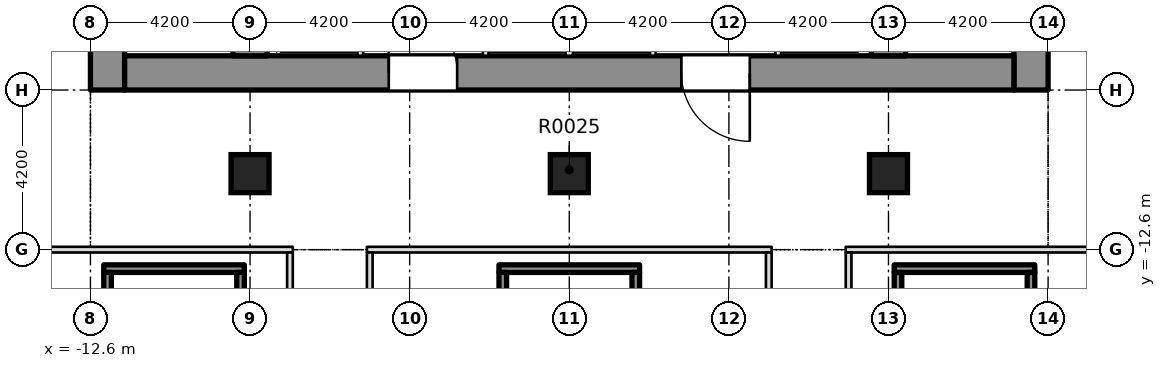
"""IFC4 building model, lengths in metres.
Left out: names, types, materials, properties, quantities, classifications, styles, units other than length and angle.
Written with IfcOpenShell. Run it as: python <this file> out.ifc"""

import sys

from ifc_helpers import new_model, si_unit, direction, frame, frame_2d, origin, origin_2d, place, context, subcontext, project, spatial, rectangle, extrude, element, fill, save


model = new_model("IFC4")
c1 = context("Model", 3, precision=1e-05, world=origin(), true_north=direction((0.0, 1.0)))
c2 = subcontext(c1, "Body", "Model", "MODEL_VIEW")
j1 = project(units=[si_unit("LENGTHUNIT", "METRE"), si_unit("PLANEANGLEUNIT", "RADIAN")], contexts=[c1])
p1 = place(None, origin())
s1 = spatial("IfcSite", under=j1, at=p1, CompositionType="ELEMENT")
p2 = place(p1, origin())
s2 = spatial("IfcBuilding", under=s1, at=p2, CompositionType="ELEMENT")
p3 = place(p2, origin())
s3 = spatial("IfcBuildingStorey", under=s2, at=p3, CompositionType="ELEMENT", Elevation=0.0)
p4 = place(p3, frame((12.15, -8.4, -0.45), z_axis=(0.0, 0.0, 1.0), x_axis=(0.0, 1.0, 0.0)))
e1 = element("IfcWall", 1, at=p4, inside=s3, PredefinedType="SHEAR", context=c2, shape_type="SweptSolid", body=[
    extrude(rectangle(XDim=30.15, YDim=0.9, at=frame_2d((15.075, 0.0))), origin(), (0.0, 0.0, 1.0), 7.55),
])
p5 = place(p4, frame((2.875, 0.0, 0.45)))
e2 = element("IfcOpeningElement", 2, at=p5, cuts=e1, PredefinedType="OPENING", context=c2, shape_type="SweptSolid", body=[
    extrude(rectangle(XDim=0.95, YDim=2.1, at=frame_2d((0.475, 1.05))), frame((0.0, 0.46, 0.0), z_axis=(0.0, -1.0, 0.0), x_axis=(1.0, 0.0, 0.0)), (0.0, 0.0, 1.0), 0.92),
])
p6 = place(p4, frame((6.575, 0.0, 0.45)))
e3 = element("IfcOpeningElement", 3, at=p6, cuts=e1, PredefinedType="OPENING", context=c2, shape_type="SweptSolid", body=[
    extrude(rectangle(XDim=0.95, YDim=2.1, at=frame_2d((0.475, 1.05))), frame((0.0, 0.46, 0.0), z_axis=(0.0, -1.0, 0.0), x_axis=(1.0, 0.0, 0.0)), (0.0, 0.0, 1.0), 0.92),
])
p7 = place(p4, frame((9.425, 0.0, 0.45)))
e4 = element("IfcOpeningElement", 4, at=p7, cuts=e1, PredefinedType="OPENING", context=c2, shape_type="SweptSolid", body=[
    extrude(rectangle(XDim=0.95, YDim=2.1, at=frame_2d((0.475, 1.05))), frame((0.0, 0.46, 0.0), z_axis=(0.0, -1.0, 0.0), x_axis=(1.0, 0.0, 0.0)), (0.0, 0.0, 1.0), 0.92),
])
p8 = place(p4, frame((13.225, 0.0, 0.45)))
e5 = element("IfcOpeningElement", 5, at=p8, cuts=e1, PredefinedType="OPENING", context=c2, shape_type="SweptSolid", body=[
    extrude(rectangle(XDim=0.95, YDim=2.1, at=frame_2d((0.475, 1.05))), frame((0.0, 0.46, 0.0), z_axis=(0.0, -1.0, 0.0), x_axis=(1.0, 0.0, 0.0)), (0.0, 0.0, 1.0), 0.92),
])
p9 = place(p4, frame((16.775, 0.0, 0.45)))
e6 = element("IfcOpeningElement", 6, at=p9, cuts=e1, PredefinedType="OPENING", context=c2, shape_type="SweptSolid", body=[
    extrude(rectangle(XDim=0.95, YDim=2.1, at=frame_2d((0.475, 1.05))), frame((0.0, 0.46, 0.0), z_axis=(0.0, -1.0, 0.0), x_axis=(1.0, 0.0, 0.0)), (0.0, 0.0, 1.0), 0.92),
])
p10 = place(p4, frame((24.75, 0.0, 0.45)))
e7 = element("IfcOpeningElement", 7, at=p10, cuts=e1, PredefinedType="OPENING", context=c2, shape_type="SweptSolid", body=[
    extrude(rectangle(XDim=0.95, YDim=2.1, at=frame_2d((0.475, 1.05))), frame((0.0, 0.46, 0.0), z_axis=(0.0, -1.0, 0.0), x_axis=(1.0, 0.0, 0.0)), (0.0, 0.0, 1.0), 0.92),
])
p11 = place(p4, frame((19.3, 0.0, 0.45)))
e8 = element("IfcOpeningElement", 8, at=p11, cuts=e1, PredefinedType="OPENING", context=c2, shape_type="SweptSolid", body=[
    extrude(rectangle(XDim=1.2, YDim=2.1, at=frame_2d((0.6, 1.05))), frame((0.0, 0.46, 0.0), z_axis=(0.0, -1.0, 0.0), x_axis=(1.0, 0.0, 0.0)), (0.0, 0.0, 1.0), 0.92),
])
p12 = place(p3, frame((-12.15, -8.4, -0.45), z_axis=(0.0, 0.0, 1.0), x_axis=(0.0, 1.0, 0.0)))
e9 = element("IfcWall", 9, at=p12, inside=s3, PredefinedType="SHEAR", context=c2, shape_type="SweptSolid", body=[
    extrude(rectangle(XDim=30.15, YDim=0.9, at=frame_2d((15.075, 0.0))), origin(), (0.0, 0.0, 1.0), 7.55),
])
p13 = place(p12, frame((3.925, 0.0, 0.45)))
e10 = element("IfcOpeningElement", 10, at=p13, cuts=e9, PredefinedType="OPENING", context=c2, shape_type="SweptSolid", body=[
    extrude(rectangle(XDim=0.95, YDim=2.1, at=frame_2d((0.475, 1.05))), frame((0.0, 0.46, 0.0), z_axis=(0.0, -1.0, 0.0), x_axis=(1.0, 0.0, 0.0)), (0.0, 0.0, 1.0), 0.92),
])
p14 = place(p12, frame((9.175, 0.0, 0.45)))
e11 = element("IfcOpeningElement", 11, at=p14, cuts=e9, PredefinedType="OPENING", context=c2, shape_type="SweptSolid", body=[
    extrude(rectangle(XDim=0.95, YDim=2.1, at=frame_2d((0.475, 1.05))), frame((0.0, 0.46, 0.0), z_axis=(0.0, -1.0, 0.0), x_axis=(1.0, 0.0, 0.0)), (0.0, 0.0, 1.0), 0.92),
])
p15 = place(p12, frame((14.525, 0.0, 0.45)))
e12 = element("IfcOpeningElement", 12, at=p15, cuts=e9, PredefinedType="OPENING", context=c2, shape_type="SweptSolid", body=[
    extrude(rectangle(XDim=0.95, YDim=2.1, at=frame_2d((0.475, 1.05))), frame((0.0, 0.46, 0.0), z_axis=(0.0, -1.0, 0.0), x_axis=(1.0, 0.0, 0.0)), (0.0, 0.0, 1.0), 0.92),
])
p16 = place(p12, frame((22.225, 0.0, 0.45)))
e13 = element("IfcOpeningElement", 13, at=p16, cuts=e9, PredefinedType="OPENING", context=c2, shape_type="SweptSolid", body=[
    extrude(rectangle(XDim=0.95, YDim=2.1, at=frame_2d((0.475, 1.05))), frame((0.0, 0.46, 0.0), z_axis=(0.0, -1.0, 0.0), x_axis=(1.0, 0.0, 0.0)), (0.0, 0.0, 1.0), 0.92),
])
p17 = place(p12, frame((26.25, 0.0, 0.45)))
e14 = element("IfcOpeningElement", 14, at=p17, cuts=e9, PredefinedType="OPENING", context=c2, shape_type="SweptSolid", body=[
    extrude(rectangle(XDim=0.95, YDim=2.1, at=frame_2d((0.475, 1.05))), frame((0.0, 0.46, 0.0), z_axis=(0.0, -1.0, 0.0), x_axis=(1.0, 0.0, 0.0)), (0.0, 0.0, 1.0), 0.92),
])
p18 = place(p12, frame((19.3, 0.0, 0.45)))
e15 = element("IfcOpeningElement", 15, at=p18, cuts=e9, PredefinedType="OPENING", context=c2, shape_type="SweptSolid", body=[
    extrude(rectangle(XDim=1.2, YDim=2.1, at=frame_2d((0.6, 1.05))), frame((0.0, 0.46, 0.0), z_axis=(0.0, -1.0, 0.0), x_axis=(1.0, 0.0, 0.0)), (0.0, 0.0, 1.0), 0.92),
])
p19 = place(p3, frame((-11.7, -7.95, -0.45), z_axis=(0.0, 0.0, 1.0), x_axis=(1.0, 0.0, 0.0)))
e16 = element("IfcWall", 16, at=p19, inside=s3, PredefinedType="SHEAR", context=c2, shape_type="SweptSolid", body=[
    extrude(rectangle(XDim=23.4, YDim=0.9, at=frame_2d((11.7, 0.0))), origin(), (0.0, 0.0, 1.0), 7.55),
])
p20 = place(p19, frame((6.95, 0.0, 0.45)))
e17 = element("IfcOpeningElement", 17, at=p20, cuts=e16, PredefinedType="OPENING", context=c2, shape_type="SweptSolid", body=[
    extrude(rectangle(XDim=1.8, YDim=2.1, at=frame_2d((0.9, 1.05))), frame((0.0, 0.46, 0.0), z_axis=(0.0, -1.0, 0.0), x_axis=(1.0, 0.0, 0.0)), (0.0, 0.0, 1.0), 0.92),
])
p21 = place(p19, frame((14.65, 0.0, 0.45)))
e18 = element("IfcOpeningElement", 18, at=p21, cuts=e16, PredefinedType="OPENING", context=c2, shape_type="SweptSolid", body=[
    extrude(rectangle(XDim=1.8, YDim=2.1, at=frame_2d((0.9, 1.05))), frame((0.0, 0.46, 0.0), z_axis=(0.0, -1.0, 0.0), x_axis=(1.0, 0.0, 0.0)), (0.0, 0.0, 1.0), 0.92),
])
p22 = place(p3, frame((-8.4, -7.5, -0.45), z_axis=(0.0, 0.0, 1.0), x_axis=(0.0, 1.0, 0.0)))
e19 = element("IfcWall", 19, at=p22, inside=s3, PredefinedType="SHEAR", context=c2, shape_type="SweptSolid", body=[
    extrude(rectangle(XDim=28.35, YDim=0.9, at=frame_2d((14.175, 0.0))), origin(), (0.0, 0.0, 1.0), 7.55),
])
p23 = place(p22, frame((18.4, 0.0, 0.45)))
e20 = element("IfcOpeningElement", 20, at=p23, cuts=e19, PredefinedType="OPENING", context=c2, shape_type="SweptSolid", body=[
    extrude(rectangle(XDim=1.2, YDim=2.1, at=frame_2d((0.6, 1.05))), frame((0.0, 0.46, 0.0), z_axis=(0.0, -1.0, 0.0), x_axis=(1.0, 0.0, 0.0)), (0.0, 0.0, 1.0), 0.92),
])
p24 = place(p3, frame((8.4, -7.5, -0.45), z_axis=(0.0, 0.0, 1.0), x_axis=(0.0, 1.0, 0.0)))
e21 = element("IfcWall", 21, at=p24, inside=s3, PredefinedType="SHEAR", context=c2, shape_type="SweptSolid", body=[
    extrude(rectangle(XDim=28.35, YDim=0.9, at=frame_2d((14.175, 0.0))), origin(), (0.0, 0.0, 1.0), 7.55),
])
p25 = place(p24, frame((18.4, 0.0, 0.45)))
e22 = element("IfcOpeningElement", 22, at=p25, cuts=e21, PredefinedType="OPENING", context=c2, shape_type="SweptSolid", body=[
    extrude(rectangle(XDim=1.2, YDim=2.1, at=frame_2d((0.6, 1.05))), frame((0.0, 0.46, 0.0), z_axis=(0.0, -1.0, 0.0), x_axis=(1.0, 0.0, 0.0)), (0.0, 0.0, 1.0), 0.92),
])
for number, where, z_axis, x_axis in (
    (23, (-8.4, -10.6, -0.45), (0.0, 0.0, 1.0), (1.0, 0.0, 0.0)),
    (24, (0.0, -10.6, -0.45), (0.0, 0.0, 1.0), (1.0, 0.0, 0.0)),
    (25, (8.4, -10.6, -0.45), (0.0, 0.0, 1.0), (1.0, 0.0, 0.0)),
):
    element("IfcColumn", number, at=place(p3, frame(where, z_axis=z_axis, x_axis=x_axis)), inside=s3, PredefinedType="COLUMN", context=c2, shape_type="SweptSolid", body=[
        extrude(rectangle(XDim=1.0, YDim=1.0, at=origin_2d()), origin(), (0.0, 0.0, 1.0), 7.55),
    ])
p26 = place(p3, frame((-16.9, -12.6, 0.0), z_axis=(0.0, 0.0, 1.0), x_axis=(1.0, 0.0, 0.0)))
e26 = element("IfcWall", 26, at=p26, inside=s3, PredefinedType="PARTITIONING", context=c2, shape_type="SweptSolid", body=[
    extrude(rectangle(XDim=9.625, YDim=0.15, at=frame_2d((4.812, 0.0))), origin(), (0.0, 0.0, 1.0), 7.1),
])
p27 = place(p3, frame((-5.325, -12.6, 0.0), z_axis=(0.0, 0.0, 1.0), x_axis=(1.0, 0.0, 0.0)))
e27 = element("IfcWall", 27, at=p27, inside=s3, PredefinedType="PARTITIONING", context=c2, shape_type="SweptSolid", body=[
    extrude(rectangle(XDim=10.65, YDim=0.15, at=frame_2d((5.325, 0.0))), origin(), (0.0, 0.0, 1.0), 7.1),
])
p28 = place(p3, frame((7.275, -12.6, 0.0), z_axis=(0.0, 0.0, 1.0), x_axis=(1.0, 0.0, 0.0)))
e28 = element("IfcWall", 28, at=p28, inside=s3, PredefinedType="PARTITIONING", context=c2, shape_type="SweptSolid", body=[
    extrude(rectangle(XDim=9.625, YDim=0.15, at=frame_2d((4.812, 0.0))), origin(), (0.0, 0.0, 1.0), 7.1),
])
for number, where, z_axis, x_axis in (
    (29, (-7.35, -18.125, 0.0), (0.0, 0.0, 1.0), (0.0, 1.0, 0.0)),
    (30, (-5.25, -18.125, 0.0), (0.0, 0.0, 1.0), (0.0, 1.0, 0.0)),
    (31, (5.25, -18.125, 0.0), (0.0, 0.0, 1.0), (0.0, 1.0, 0.0)),
    (32, (7.35, -18.125, 0.0), (0.0, 0.0, 1.0), (0.0, 1.0, 0.0)),
):
    element("IfcWall", number, at=place(p3, frame(where, z_axis=z_axis, x_axis=x_axis)), inside=s3, PredefinedType="PARTITIONING", context=c2, shape_type="SweptSolid", body=[
        extrude(rectangle(XDim=5.45, YDim=0.15, at=frame_2d((2.725, 0.0))), origin(), (0.0, 0.0, 1.0), 7.1),
    ])
p29 = place(p3, frame((-5.5, -7.499, 0.0), z_axis=(0.0, 0.0, 1.0), x_axis=(0.0, 1.0, 0.0)))
e33 = element("IfcWall", 33, at=p29, inside=s3, PredefinedType="PARTITIONING", context=c2, shape_type="SweptSolid", body=[
    extrude(rectangle(XDim=11.924, YDim=0.15, at=frame_2d((5.962, 0.0))), origin(), (0.0, 0.0, 1.0), 7.1),
])
p30 = place(p29, frame((0.949, 0.0, 0.0)))
e34 = element("IfcOpeningElement", 34, at=p30, cuts=e33, PredefinedType="OPENING", context=c2, shape_type="SweptSolid", body=[
    extrude(rectangle(XDim=1.1, YDim=2.1, at=frame_2d((0.55, 1.05))), frame((0.0, 0.085, 0.0), z_axis=(0.0, -1.0, 0.0), x_axis=(1.0, 0.0, 0.0)), (0.0, 0.0, 1.0), 0.17),
])
p31 = place(p29, frame((3.949, 0.0, 0.0)))
e35 = element("IfcOpeningElement", 35, at=p31, cuts=e33, PredefinedType="OPENING", context=c2, shape_type="SweptSolid", body=[
    extrude(rectangle(XDim=1.1, YDim=2.1, at=frame_2d((0.55, 1.05))), frame((0.0, 0.085, 0.0), z_axis=(0.0, -1.0, 0.0), x_axis=(1.0, 0.0, 0.0)), (0.0, 0.0, 1.0), 0.17),
])
p32 = place(p29, frame((6.949, 0.0, 0.0)))
e36 = element("IfcOpeningElement", 36, at=p32, cuts=e33, PredefinedType="OPENING", context=c2, shape_type="SweptSolid", body=[
    extrude(rectangle(XDim=1.1, YDim=2.1, at=frame_2d((0.55, 1.05))), frame((0.0, 0.085, 0.0), z_axis=(0.0, -1.0, 0.0), x_axis=(1.0, 0.0, 0.0)), (0.0, 0.0, 1.0), 0.17),
])
p33 = place(p29, frame((9.949, 0.0, 0.0)))
e37 = element("IfcOpeningElement", 37, at=p33, cuts=e33, PredefinedType="OPENING", context=c2, shape_type="SweptSolid", body=[
    extrude(rectangle(XDim=1.1, YDim=2.1, at=frame_2d((0.55, 1.05))), frame((0.0, 0.085, 0.0), z_axis=(0.0, -1.0, 0.0), x_axis=(1.0, 0.0, 0.0)), (0.0, 0.0, 1.0), 0.17),
])
p34 = place(p3, frame((-2.2, -7.499, 0.0), z_axis=(0.0, 0.0, 1.0), x_axis=(0.0, 1.0, 0.0)))
e38 = element("IfcWall", 38, at=p34, inside=s3, PredefinedType="PARTITIONING", context=c2, shape_type="SweptSolid", body=[
    extrude(rectangle(XDim=11.924, YDim=0.15, at=frame_2d((5.962, 0.0))), origin(), (0.0, 0.0, 1.0), 7.1),
])
p35 = place(p34, frame((0.949, 0.0, 0.0)))
e39 = element("IfcOpeningElement", 39, at=p35, cuts=e38, PredefinedType="OPENING", context=c2, shape_type="SweptSolid", body=[
    extrude(rectangle(XDim=1.1, YDim=2.1, at=frame_2d((0.55, 1.05))), frame((0.0, 0.085, 0.0), z_axis=(0.0, -1.0, 0.0), x_axis=(1.0, 0.0, 0.0)), (0.0, 0.0, 1.0), 0.17),
])
p36 = place(p34, frame((3.949, 0.0, 0.0)))
e40 = element("IfcOpeningElement", 40, at=p36, cuts=e38, PredefinedType="OPENING", context=c2, shape_type="SweptSolid", body=[
    extrude(rectangle(XDim=1.1, YDim=2.1, at=frame_2d((0.55, 1.05))), frame((0.0, 0.085, 0.0), z_axis=(0.0, -1.0, 0.0), x_axis=(1.0, 0.0, 0.0)), (0.0, 0.0, 1.0), 0.17),
])
p37 = place(p34, frame((6.949, 0.0, 0.0)))
e41 = element("IfcOpeningElement", 41, at=p37, cuts=e38, PredefinedType="OPENING", context=c2, shape_type="SweptSolid", body=[
    extrude(rectangle(XDim=1.1, YDim=2.1, at=frame_2d((0.55, 1.05))), frame((0.0, 0.085, 0.0), z_axis=(0.0, -1.0, 0.0), x_axis=(1.0, 0.0, 0.0)), (0.0, 0.0, 1.0), 0.17),
])
p38 = place(p34, frame((9.949, 0.0, 0.0)))
e42 = element("IfcOpeningElement", 42, at=p38, cuts=e38, PredefinedType="OPENING", context=c2, shape_type="SweptSolid", body=[
    extrude(rectangle(XDim=1.1, YDim=2.1, at=frame_2d((0.55, 1.05))), frame((0.0, 0.085, 0.0), z_axis=(0.0, -1.0, 0.0), x_axis=(1.0, 0.0, 0.0)), (0.0, 0.0, 1.0), 0.17),
])
p39 = place(p3, frame((0.0, -7.499, 0.0), z_axis=(0.0, 0.0, 1.0), x_axis=(0.0, 1.0, 0.0)))
e43 = element("IfcWall", 43, at=p39, inside=s3, PredefinedType="PARTITIONING", context=c2, shape_type="SweptSolid", body=[
    extrude(rectangle(XDim=11.924, YDim=0.2, at=frame_2d((5.962, 0.0))), origin(), (0.0, 0.0, 1.0), 7.1),
])
p40 = place(p3, frame((2.2, -7.499, 0.0), z_axis=(0.0, 0.0, 1.0), x_axis=(0.0, 1.0, 0.0)))
e44 = element("IfcWall", 44, at=p40, inside=s3, PredefinedType="PARTITIONING", context=c2, shape_type="SweptSolid", body=[
    extrude(rectangle(XDim=11.924, YDim=0.15, at=frame_2d((5.962, 0.0))), origin(), (0.0, 0.0, 1.0), 7.1),
])
p41 = place(p40, frame((0.949, 0.0, 0.0)))
e45 = element("IfcOpeningElement", 45, at=p41, cuts=e44, PredefinedType="OPENING", context=c2, shape_type="SweptSolid", body=[
    extrude(rectangle(XDim=1.1, YDim=2.1, at=frame_2d((0.55, 1.05))), frame((0.0, 0.085, 0.0), z_axis=(0.0, -1.0, 0.0), x_axis=(1.0, 0.0, 0.0)), (0.0, 0.0, 1.0), 0.17),
])
p42 = place(p40, frame((3.949, 0.0, 0.0)))
e46 = element("IfcOpeningElement", 46, at=p42, cuts=e44, PredefinedType="OPENING", context=c2, shape_type="SweptSolid", body=[
    extrude(rectangle(XDim=1.1, YDim=2.1, at=frame_2d((0.55, 1.05))), frame((0.0, 0.085, 0.0), z_axis=(0.0, -1.0, 0.0), x_axis=(1.0, 0.0, 0.0)), (0.0, 0.0, 1.0), 0.17),
])
p43 = place(p40, frame((6.949, 0.0, 0.0)))
e47 = element("IfcOpeningElement", 47, at=p43, cuts=e44, PredefinedType="OPENING", context=c2, shape_type="SweptSolid", body=[
    extrude(rectangle(XDim=1.1, YDim=2.1, at=frame_2d((0.55, 1.05))), frame((0.0, 0.085, 0.0), z_axis=(0.0, -1.0, 0.0), x_axis=(1.0, 0.0, 0.0)), (0.0, 0.0, 1.0), 0.17),
])
p44 = place(p40, frame((9.949, 0.0, 0.0)))
e48 = element("IfcOpeningElement", 48, at=p44, cuts=e44, PredefinedType="OPENING", context=c2, shape_type="SweptSolid", body=[
    extrude(rectangle(XDim=1.1, YDim=2.1, at=frame_2d((0.55, 1.05))), frame((0.0, 0.085, 0.0), z_axis=(0.0, -1.0, 0.0), x_axis=(1.0, 0.0, 0.0)), (0.0, 0.0, 1.0), 0.17),
])
p45 = place(p3, frame((5.5, -7.499, 0.0), z_axis=(0.0, 0.0, 1.0), x_axis=(0.0, 1.0, 0.0)))
e49 = element("IfcWall", 49, at=p45, inside=s3, PredefinedType="PARTITIONING", context=c2, shape_type="SweptSolid", body=[
    extrude(rectangle(XDim=11.924, YDim=0.15, at=frame_2d((5.962, 0.0))), origin(), (0.0, 0.0, 1.0), 7.1),
])
p46 = place(p45, frame((0.949, 0.0, 0.0)))
e50 = element("IfcOpeningElement", 50, at=p46, cuts=e49, PredefinedType="OPENING", context=c2, shape_type="SweptSolid", body=[
    extrude(rectangle(XDim=1.1, YDim=2.1, at=frame_2d((0.55, 1.05))), frame((0.0, 0.085, 0.0), z_axis=(0.0, -1.0, 0.0), x_axis=(1.0, 0.0, 0.0)), (0.0, 0.0, 1.0), 0.17),
])
p47 = place(p45, frame((3.949, 0.0, 0.0)))
e51 = element("IfcOpeningElement", 51, at=p47, cuts=e49, PredefinedType="OPENING", context=c2, shape_type="SweptSolid", body=[
    extrude(rectangle(XDim=1.1, YDim=2.1, at=frame_2d((0.55, 1.05))), frame((0.0, 0.085, 0.0), z_axis=(0.0, -1.0, 0.0), x_axis=(1.0, 0.0, 0.0)), (0.0, 0.0, 1.0), 0.17),
])
p48 = place(p45, frame((6.949, 0.0, 0.0)))
e52 = element("IfcOpeningElement", 52, at=p48, cuts=e49, PredefinedType="OPENING", context=c2, shape_type="SweptSolid", body=[
    extrude(rectangle(XDim=1.1, YDim=2.1, at=frame_2d((0.55, 1.05))), frame((0.0, 0.085, 0.0), z_axis=(0.0, -1.0, 0.0), x_axis=(1.0, 0.0, 0.0)), (0.0, 0.0, 1.0), 0.17),
])
p49 = place(p45, frame((9.949, 0.0, 0.0)))
e53 = element("IfcOpeningElement", 53, at=p49, cuts=e49, PredefinedType="OPENING", context=c2, shape_type="SweptSolid", body=[
    extrude(rectangle(XDim=1.1, YDim=2.1, at=frame_2d((0.55, 1.05))), frame((0.0, 0.085, 0.0), z_axis=(0.0, -1.0, 0.0), x_axis=(1.0, 0.0, 0.0)), (0.0, 0.0, 1.0), 0.17),
])
p50 = place(p3, frame((-12.25, -13.1, 0.0), z_axis=(0.0, 0.0, 1.0), x_axis=(1.0, 0.0, 0.0)))
e54 = element("IfcWall", 54, at=p50, inside=s3, PredefinedType="SOLIDWALL", context=c2, shape_type="SweptSolid", body=[
    extrude(rectangle(XDim=3.7, YDim=0.2, at=frame_2d((1.85, 0.0))), origin(), (0.0, 0.0, 1.0), 7.1),
])
p51 = place(p3, frame((-12.15, -19.8, 0.0), z_axis=(0.0, 0.0, 1.0), x_axis=(0.0, 1.0, 0.0)))
e55 = element("IfcWall", 55, at=p51, inside=s3, PredefinedType="SOLIDWALL", context=c2, shape_type="SweptSolid", body=[
    extrude(rectangle(XDim=6.6, YDim=0.2, at=frame_2d((3.3, 0.0))), origin(), (0.0, 0.0, 1.0), 7.1),
])
p52 = place(p3, frame((-8.65, -20.3, 0.0), z_axis=(0.0, 0.0, 1.0), x_axis=(0.0, 1.0, 0.0)))
e56 = element("IfcWall", 56, at=p52, inside=s3, PredefinedType="SOLIDWALL", context=c2, shape_type="SweptSolid", body=[
    extrude(rectangle(XDim=7.1, YDim=0.2, at=frame_2d((3.55, 0.0))), origin(), (0.0, 0.0, 1.0), 7.1),
])
p53 = place(p3, frame((-1.85, -13.1, 0.0), z_axis=(0.0, 0.0, 1.0), x_axis=(1.0, 0.0, 0.0)))
e57 = element("IfcWall", 57, at=p53, inside=s3, PredefinedType="SOLIDWALL", context=c2, shape_type="SweptSolid", body=[
    extrude(rectangle(XDim=3.7, YDim=0.2, at=frame_2d((1.85, 0.0))), origin(), (0.0, 0.0, 1.0), 7.1),
])
for number, where, z_axis, x_axis in (
    (58, (-1.75, -19.8, 0.0), (0.0, 0.0, 1.0), (0.0, 1.0, 0.0)),
    (59, (1.75, -19.8, 0.0), (0.0, 0.0, 1.0), (0.0, 1.0, 0.0)),
):
    element("IfcWall", number, at=place(p3, frame(where, z_axis=z_axis, x_axis=x_axis)), inside=s3, PredefinedType="SOLIDWALL", context=c2, shape_type="SweptSolid", body=[
        extrude(rectangle(XDim=6.6, YDim=0.2, at=frame_2d((3.3, 0.0))), origin(), (0.0, 0.0, 1.0), 7.1),
    ])
p54 = place(p3, frame((8.55, -13.1, 0.0), z_axis=(0.0, 0.0, 1.0), x_axis=(1.0, 0.0, 0.0)))
e60 = element("IfcWall", 60, at=p54, inside=s3, PredefinedType="SOLIDWALL", context=c2, shape_type="SweptSolid", body=[
    extrude(rectangle(XDim=3.7, YDim=0.2, at=frame_2d((1.85, 0.0))), origin(), (0.0, 0.0, 1.0), 7.1),
])
p55 = place(p3, frame((8.65, -20.3, 0.0), z_axis=(0.0, 0.0, 1.0), x_axis=(0.0, 1.0, 0.0)))
e61 = element("IfcWall", 61, at=p55, inside=s3, PredefinedType="SOLIDWALL", context=c2, shape_type="SweptSolid", body=[
    extrude(rectangle(XDim=7.1, YDim=0.2, at=frame_2d((3.55, 0.0))), origin(), (0.0, 0.0, 1.0), 7.1),
])
p56 = place(p3, frame((12.15, -19.8, 0.0), z_axis=(0.0, 0.0, 1.0), x_axis=(0.0, 1.0, 0.0)))
e62 = element("IfcWall", 62, at=p56, inside=s3, PredefinedType="SOLIDWALL", context=c2, shape_type="SweptSolid", body=[
    extrude(rectangle(XDim=6.6, YDim=0.2, at=frame_2d((3.3, 0.0))), origin(), (0.0, 0.0, 1.0), 7.1),
])
p57 = place(p20, origin())
e63 = element("IfcDoor", 63, at=p57, inside=s3, OperationType="SINGLE_SWING_LEFT", PredefinedType="DOOR", context=c2, shape_type="SweptSolid", body=[
    extrude(rectangle(XDim=1.8, YDim=2.1, at=frame_2d((0.9, 1.05))), frame((0.0, 0.025, 0.0), z_axis=(0.0, -1.0, 0.0), x_axis=(1.0, 0.0, 0.0)), (0.0, 0.0, 1.0), 0.05),
])
fill(e17, e63)
p58 = place(p21, origin())
e64 = element("IfcDoor", 64, at=p58, inside=s3, OperationType="SINGLE_SWING_LEFT", PredefinedType="DOOR", context=c2, shape_type="SweptSolid", body=[
    extrude(rectangle(XDim=1.8, YDim=2.1, at=frame_2d((0.9, 1.05))), frame((0.0, 0.025, 0.0), z_axis=(0.0, -1.0, 0.0), x_axis=(1.0, 0.0, 0.0)), (0.0, 0.0, 1.0), 0.05),
])
fill(e18, e64)
save(model, sys.argv[1])
